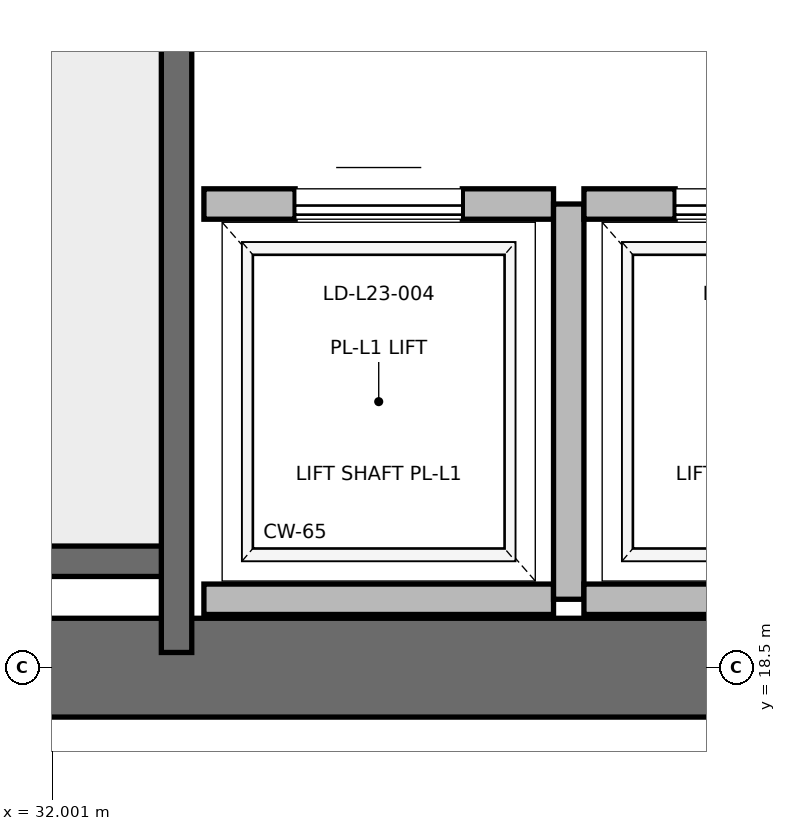
"""IFC4 building model, lengths in metres.
Left out: names, types, materials, properties, quantities, classifications, styles, units other than length and angle.
Written with IfcOpenShell. Run it as: python <this file> out.ifc"""

import sys

from ifc_helpers import new_model, si_unit, direction, frame, frame_2d, origin, place, context, subcontext, project, spatial, rectangle, extrude, element, fill, save


model = new_model("IFC4")
c1 = context("Model", 3, precision=1e-05, world=origin(), true_north=direction((0.0, 1.0)))
c2 = subcontext(c1, "Body", "Model", "MODEL_VIEW")
j1 = project(units=[si_unit("LENGTHUNIT", "METRE"), si_unit("PLANEANGLEUNIT", "RADIAN")], contexts=[c1])
p1 = place(None, origin())
s1 = spatial("IfcSite", under=j1, at=p1, CompositionType="ELEMENT")
p2 = place(p1, origin())
s2 = spatial("IfcBuilding", under=s1, at=p2, CompositionType="ELEMENT")
p3 = place(p2, frame((0.0, 0.0, 99.6)))
s3 = spatial("IfcBuildingStorey", under=s2, at=p3, CompositionType="ELEMENT", Elevation=99.6)
p4 = place(p3, frame((29.0, 18.5, 0.0), z_axis=(0.0, 0.0, 1.0), x_axis=(1.0, 0.0, 0.0)))
e1 = element("IfcWall", 1, at=p4, inside=s3, PredefinedType="SHEAR", context=c2, shape_type="SweptSolid", body=[
    extrude(rectangle(XDim=9.2, YDim=0.65, at=frame_2d((4.6, 0.0))), origin(), (0.0, 0.0, 1.0), 3.76),
])
p5 = place(p3, frame((29.7, 19.2, 0.0), z_axis=(0.0, 0.0, 1.0), x_axis=(1.0, 0.0, 0.0)))
e2 = element("IfcWall", 2, at=p5, inside=s3, PredefinedType="SOLIDWALL", context=c2, shape_type="SweptSolid", body=[
    extrude(rectangle(XDim=3.12, YDim=0.2, at=frame_2d((1.56, 0.0))), origin(), (0.0, 0.0, 1.0), 3.76),
])
p6 = place(p3, frame((32.82, 18.6, 0.0), z_axis=(0.0, 0.0, 1.0), x_axis=(0.0, 1.0, 0.0)))
e3 = element("IfcWall", 3, at=p6, inside=s3, PredefinedType="SOLIDWALL", context=c2, shape_type="SweptSolid", body=[
    extrude(rectangle(XDim=8.78, YDim=0.2, at=frame_2d((4.39, 0.0))), origin(), (0.0, 0.0, 1.0), 3.76),
])
p7 = place(p3, frame((33.0, 18.95, 0.0), z_axis=(0.0, 0.0, 1.0), x_axis=(1.0, 0.0, 0.0)))
e4 = element("IfcWall", 4, at=p7, inside=s3, PredefinedType="SOLIDWALL", context=c2, shape_type="SweptSolid", body=[
    extrude(rectangle(XDim=2.3, YDim=0.2, at=frame_2d((1.15, 0.0))), origin(), (0.0, 0.0, 1.0), 3.76),
])
p8 = place(p3, frame((35.3, 21.55, 0.0), z_axis=(0.0, 0.0, 1.0), x_axis=(-1.0, 0.0, 0.0)))
e5 = element("IfcWall", 5, at=p8, inside=s3, PredefinedType="SOLIDWALL", context=c2, shape_type="SweptSolid", body=[
    extrude(rectangle(XDim=2.3, YDim=0.2, at=frame_2d((1.15, 0.0))), origin(), (0.0, 0.0, 1.0), 3.76),
])
p9 = place(p8, frame((0.6, 0.0, 0.0)))
e6 = element("IfcOpeningElement", 6, at=p9, cuts=e5, PredefinedType="OPENING", context=c2, shape_type="SweptSolid", body=[
    extrude(rectangle(XDim=1.1, YDim=2.2, at=frame_2d((0.55, 1.1))), frame((0.0, 0.1, 0.0), z_axis=(0.0, -1.0, 0.0), x_axis=(1.0, 0.0, 0.0)), (0.0, 0.0, 1.0), 0.2),
])
p10 = place(p3, frame((35.4, 18.95, 0.0), z_axis=(0.0, 0.0, 1.0), x_axis=(0.0, 1.0, 0.0)))
e7 = element("IfcWall", 7, at=p10, inside=s3, PredefinedType="SOLIDWALL", context=c2, shape_type="SweptSolid", body=[
    extrude(rectangle(XDim=2.6, YDim=0.2, at=frame_2d((1.3, 0.0))), origin(), (0.0, 0.0, 1.0), 3.76),
])
p11 = place(p3, frame((35.5, 18.95, 0.0), z_axis=(0.0, 0.0, 1.0), x_axis=(1.0, 0.0, 0.0)))
e8 = element("IfcWall", 8, at=p11, inside=s3, PredefinedType="SOLIDWALL", context=c2, shape_type="SweptSolid", body=[
    extrude(rectangle(XDim=2.3, YDim=0.2, at=frame_2d((1.15, 0.0))), origin(), (0.0, 0.0, 1.0), 2.54),
])
p12 = place(p3, frame((37.8, 21.55, 0.0), z_axis=(0.0, 0.0, 1.0), x_axis=(-1.0, 0.0, 0.0)))
e9 = element("IfcWall", 9, at=p12, inside=s3, PredefinedType="SOLIDWALL", context=c2, shape_type="SweptSolid", body=[
    extrude(rectangle(XDim=2.3, YDim=0.2, at=frame_2d((1.15, 0.0))), origin(), (0.0, 0.0, 1.0), 3.76),
])
p13 = place(p12, frame((0.6, 0.0, 0.0)))
e10 = element("IfcOpeningElement", 10, at=p13, cuts=e9, PredefinedType="OPENING", context=c2, shape_type="SweptSolid", body=[
    extrude(rectangle(XDim=1.1, YDim=2.2, at=frame_2d((0.55, 1.1))), frame((0.0, 0.1, 0.0), z_axis=(0.0, -1.0, 0.0), x_axis=(1.0, 0.0, 0.0)), (0.0, 0.0, 1.0), 0.2),
])
p14 = place(p9, origin())
e11 = element("IfcDoor", 11, at=p14, inside=s3, OperationType="SLIDING_TO_RIGHT", PredefinedType="DOOR", context=c2, shape_type="SweptSolid", body=[
    extrude(rectangle(XDim=1.1, YDim=2.2, at=frame_2d((0.55, 1.1))), frame((0.0, 0.025, 0.0), z_axis=(0.0, -1.0, 0.0), x_axis=(1.0, 0.0, 0.0)), (0.0, 0.0, 1.0), 0.05),
])
fill(e6, e11)
p15 = place(p13, origin())
e12 = element("IfcDoor", 12, at=p15, inside=s3, OperationType="SLIDING_TO_RIGHT", PredefinedType="DOOR", context=c2, shape_type="SweptSolid", body=[
    extrude(rectangle(XDim=1.1, YDim=2.2, at=frame_2d((0.55, 1.1))), frame((0.0, 0.025, 0.0), z_axis=(0.0, -1.0, 0.0), x_axis=(1.0, 0.0, 0.0)), (0.0, 0.0, 1.0), 0.05),
])
fill(e10, e12)
save(model, sys.argv[1])
